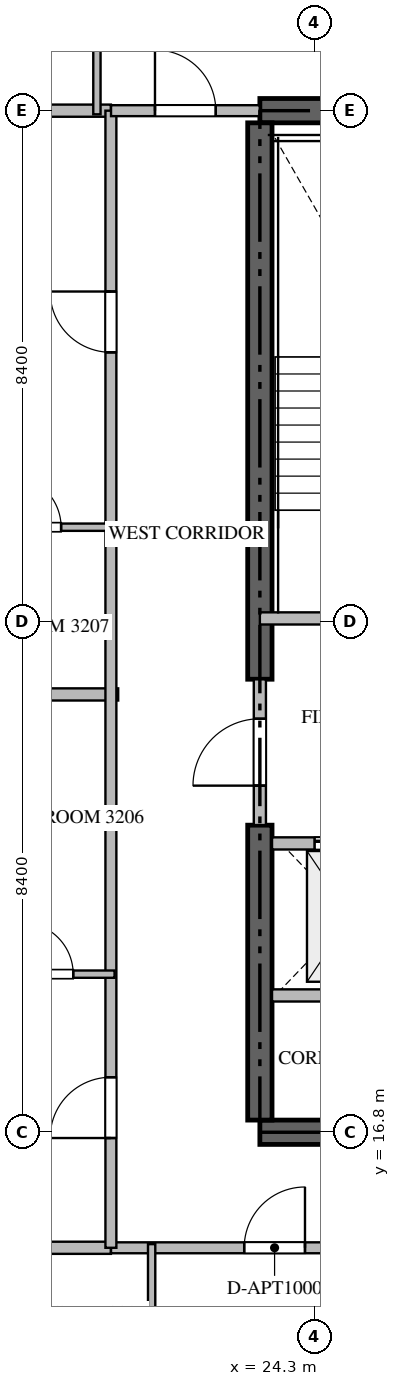
"""IFC4 building model, lengths in metres.
Left out: names, types, materials, properties, quantities, classifications, styles, units other than length and angle.
Written with IfcOpenShell. Run it as: python <this file> out.ifc"""

import sys

from ifc_helpers import new_model, si_unit, direction, frame, frame_2d, origin, place, context, subcontext, project, spatial, rectangle, extrude, source, transform, mapped, element, fill, save


model = new_model("IFC4")
c1 = context("Model", 3, precision=1e-05, world=origin(), true_north=direction((0.0, 1.0)))
c2 = subcontext(c1, "Body", "Model", "MODEL_VIEW")
j1 = project(units=[si_unit("LENGTHUNIT", "METRE"), si_unit("PLANEANGLEUNIT", "RADIAN")], contexts=[c1])
p1 = place(None, origin())
s1 = spatial("IfcSite", under=j1, at=p1, CompositionType="ELEMENT")
p2 = place(p1, origin())
s2 = spatial("IfcBuilding", under=s1, at=p2, CompositionType="ELEMENT")
p3 = place(p2, frame((0.0, 0.0, 131.4)))
s3 = spatial("IfcBuildingStorey", under=s2, at=p3, CompositionType="ELEMENT", Elevation=131.4)
for number, where, z_axis, x_axis in (
    (1, (23.4, 16.8, -0.26), (0.0, 0.0, 1.0), (1.0, 0.0, 0.0)),
    (2, (41.4, 33.6, -0.26), (0.0, 0.0, 1.0), (-1.0, 0.0, 0.0)),
):
    element("IfcWall", number, at=place(p3, frame(where, z_axis=z_axis, x_axis=x_axis)), inside=s3, PredefinedType="SHEAR", context=c2, shape_type="SweptSolid", body=[
        extrude(rectangle(XDim=18.0, YDim=0.4, at=frame_2d((9.0, 0.0))), origin(), (0.0, 0.0, 1.0), 3.748),
    ])
p4 = place(p3, frame((23.4, 17.0, -0.26), z_axis=(0.0, 0.0, 1.0), x_axis=(0.0, 1.0, 0.0)))
e3 = element("IfcWall", 3, at=p4, inside=s3, PredefinedType="SHEAR", context=c2, shape_type="SweptSolid", body=[
    extrude(rectangle(XDim=4.85, YDim=0.4, at=frame_2d((2.425, 0.0))), origin(), (0.0, 0.0, 1.0), 3.748),
])
p5 = place(p3, frame((23.4, 24.25, -0.26), z_axis=(0.0, 0.0, 1.0), x_axis=(0.0, 1.0, 0.0)))
e4 = element("IfcWall", 4, at=p5, inside=s3, PredefinedType="SHEAR", context=c2, shape_type="SweptSolid", body=[
    extrude(rectangle(XDim=9.15, YDim=0.4, at=frame_2d((4.575, 0.0))), origin(), (0.0, 0.0, 1.0), 3.748),
])
p6 = place(p3, frame((23.4, 25.25, 0.0), z_axis=(0.0, 0.0, 1.0), x_axis=(1.0, 0.0, 0.0)))
e5 = element("IfcWall", 5, at=p6, inside=s3, PredefinedType="STANDARD", context=c2, shape_type="SweptSolid", body=[
    extrude(rectangle(XDim=4.45, YDim=0.2, at=frame_2d((2.225, 0.0))), origin(), (0.0, 0.0, 1.0), 3.49),
])
p7 = place(p6, frame((1.65, 0.0, 0.0)))
e6 = element("IfcOpeningElement", 6, at=p7, cuts=e5, PredefinedType="OPENING", context=c2, shape_type="SweptSolid", body=[
    extrude(rectangle(XDim=1.1, YDim=2.15, at=frame_2d((0.55, 1.075))), frame((0.0, 0.11, 0.0), z_axis=(0.0, -1.0, 0.0), x_axis=(1.0, 0.0, 0.0)), (0.0, 0.0, 1.0), 0.22),
])
p8 = place(p3, frame((23.6, 21.55, 0.0), z_axis=(0.0, 0.0, 1.0), x_axis=(1.0, 0.0, 0.0)))
e7 = element("IfcWall", 7, at=p8, inside=s3, PredefinedType="STANDARD", context=c2, shape_type="SweptSolid", body=[
    extrude(rectangle(XDim=2.45, YDim=0.2, at=frame_2d((1.225, 0.0))), origin(), (0.0, 0.0, 1.0), 3.49),
])
p9 = place(p8, frame((0.7, 0.0, 0.0)))
e8 = element("IfcOpeningElement", 8, at=p9, cuts=e7, PredefinedType="OPENING", context=c2, shape_type="SweptSolid", body=[
    extrude(rectangle(XDim=1.2, YDim=2.2, at=frame_2d((0.6, 1.1))), frame((0.0, 0.11, 0.0), z_axis=(0.0, -1.0, 0.0), x_axis=(1.0, 0.0, 0.0)), (0.0, 0.0, 1.0), 0.22),
])
p10 = place(p3, frame((23.6, 19.05, 0.0), z_axis=(0.0, 0.0, 1.0), x_axis=(1.0, 0.0, 0.0)))
e9 = element("IfcWall", 9, at=p10, inside=s3, PredefinedType="STANDARD", context=c2, shape_type="SweptSolid", body=[
    extrude(rectangle(XDim=2.45, YDim=0.2, at=frame_2d((1.225, 0.0))), origin(), (0.0, 0.0, 1.0), 3.49),
])
p11 = place(p3, frame((23.4, 21.852, 0.0), z_axis=(0.0, 0.0, 1.0), x_axis=(0.0, 1.0, 0.0)))
e10 = element("IfcWall", 10, at=p11, inside=s3, PredefinedType="STANDARD", context=c2, shape_type="SweptSolid", body=[
    extrude(rectangle(XDim=2.396, YDim=0.2, at=frame_2d((1.198, 0.0))), origin(), (0.0, 0.0, 1.0), 3.49),
])
p12 = place(p11, frame((0.648, 0.0, 0.0)))
e11 = element("IfcOpeningElement", 11, at=p12, cuts=e10, PredefinedType="OPENING", context=c2, shape_type="SweptSolid", body=[
    extrude(rectangle(XDim=1.1, YDim=2.15, at=frame_2d((0.55, 1.075))), frame((0.0, 0.11, 0.0), z_axis=(0.0, -1.0, 0.0), x_axis=(1.0, 0.0, 0.0)), (0.0, 0.0, 1.0), 0.22),
])
p13 = place(p3, frame((7.882, 24.0, 0.0), z_axis=(0.0, 0.0, 1.0), x_axis=(1.0, 0.0, 0.0)))
e12 = element("IfcWall", 12, at=p13, inside=s3, PredefinedType="PARTITIONING", context=c2, shape_type="SweptSolid", body=[
    extrude(rectangle(XDim=13.188, YDim=0.2, at=frame_2d((6.594, 0.0))), origin(), (0.0, 0.0, 1.0), 3.49),
])
for number, where, z_axis, x_axis in (
    (13, (7.882, 14.9, 0.0), (0.0, 0.0, 1.0), (1.0, 0.0, 0.0)),
    (14, (7.882, 33.6, 0.0), (0.0, 0.0, 1.0), (1.0, 0.0, 0.0)),
):
    element("IfcWall", number, at=place(p3, frame(where, z_axis=z_axis, x_axis=x_axis)), inside=s3, PredefinedType="PARTITIONING", context=c2, shape_type="SweptSolid", body=[
        extrude(rectangle(XDim=13.068, YDim=0.2, at=frame_2d((6.534, 0.0))), origin(), (0.0, 0.0, 1.0), 3.49),
    ])
p14 = place(p3, frame((20.952, 14.9, 0.0), z_axis=(0.0, 0.0, 1.0), x_axis=(1.0, 0.0, 0.0)))
e15 = element("IfcWall", 15, at=p14, inside=s3, PredefinedType="PARTITIONING", context=c2, shape_type="SweptSolid", body=[
    extrude(rectangle(XDim=22.896, YDim=0.18, at=frame_2d((11.448, 0.0))), origin(), (0.0, 0.0, 1.0), 3.49),
])
p15 = place(p14, frame((2.19, 0.0, 0.0)))
e16 = element("IfcOpeningElement", 16, at=p15, cuts=e15, PredefinedType="OPENING", context=c2, shape_type="SweptSolid", body=[
    extrude(rectangle(XDim=1.0, YDim=2.15, at=frame_2d((0.5, 1.075))), frame((0.0, 0.1, 0.0), z_axis=(0.0, -1.0, 0.0), x_axis=(1.0, 0.0, 0.0)), (0.0, 0.0, 1.0), 0.2),
])
p16 = place(p14, frame((14.955, 0.0, 0.0)))
e17 = element("IfcOpeningElement", 17, at=p16, cuts=e15, PredefinedType="OPENING", context=c2, shape_type="SweptSolid", body=[
    extrude(rectangle(XDim=1.0, YDim=2.15, at=frame_2d((0.5, 1.075))), frame((0.0, 0.1, 0.0), z_axis=(0.0, -1.0, 0.0), x_axis=(1.0, 0.0, 0.0)), (0.0, 0.0, 1.0), 0.2),
])
p17 = place(p14, frame((19.509, 0.0, 0.0)))
e18 = element("IfcOpeningElement", 18, at=p17, cuts=e15, PredefinedType="OPENING", context=c2, shape_type="SweptSolid", body=[
    extrude(rectangle(XDim=1.0, YDim=2.15, at=frame_2d((0.5, 1.075))), frame((0.0, 0.1, 0.0), z_axis=(0.0, -1.0, 0.0), x_axis=(1.0, 0.0, 0.0)), (0.0, 0.0, 1.0), 0.2),
])
p18 = place(p3, frame((20.95, 14.9, 0.0), z_axis=(0.0, 0.0, 1.0), x_axis=(0.0, 1.0, 0.0)))
e19 = element("IfcWall", 19, at=p18, inside=s3, PredefinedType="PARTITIONING", context=c2, shape_type="SweptSolid", body=[
    extrude(rectangle(XDim=18.7, YDim=0.18, at=frame_2d((9.35, 0.0))), origin(), (0.0, 0.0, 1.0), 3.49),
])
p19 = place(p18, frame((1.805, 0.0, 0.0)))
e20 = element("IfcOpeningElement", 20, at=p19, cuts=e19, PredefinedType="OPENING", context=c2, shape_type="SweptSolid", body=[
    extrude(rectangle(XDim=1.0, YDim=2.15, at=frame_2d((0.5, 1.075))), frame((0.0, 0.1, 0.0), z_axis=(0.0, -1.0, 0.0), x_axis=(1.0, 0.0, 0.0)), (0.0, 0.0, 1.0), 0.2),
])
p20 = place(p18, frame((14.726, 0.0, 0.0)))
e21 = element("IfcOpeningElement", 21, at=p20, cuts=e19, PredefinedType="OPENING", context=c2, shape_type="SweptSolid", body=[
    extrude(rectangle(XDim=1.0, YDim=2.15, at=frame_2d((0.5, 1.075))), frame((0.0, 0.1, 0.0), z_axis=(0.0, -1.0, 0.0), x_axis=(1.0, 0.0, 0.0)), (0.0, 0.0, 1.0), 0.2),
])
p21 = place(p3, frame((20.952, 33.6, 0.0), z_axis=(0.0, 0.0, 1.0), x_axis=(1.0, 0.0, 0.0)))
e22 = element("IfcWall", 22, at=p21, inside=s3, PredefinedType="PARTITIONING", context=c2, shape_type="SweptSolid", body=[
    extrude(rectangle(XDim=2.446, YDim=0.18, at=frame_2d((1.223, 0.0))), origin(), (0.0, 0.0, 1.0), 3.49),
])
p22 = place(p21, frame((0.723, 0.0, 0.0)))
e23 = element("IfcOpeningElement", 23, at=p22, cuts=e22, PredefinedType="OPENING", context=c2, shape_type="SweptSolid", body=[
    extrude(rectangle(XDim=1.0, YDim=2.15, at=frame_2d((0.5, 1.075))), frame((0.0, 0.1, 0.0), z_axis=(0.0, -1.0, 0.0), x_axis=(1.0, 0.0, 0.0)), (0.0, 0.0, 1.0), 0.2),
])
for number, where, z_axis, x_axis in (
    (24, (21.62, 12.15, 0.0), (0.0, 0.0, 1.0), (0.0, 1.0, 0.0)),
    (25, (20.72, 36.35, 0.0), (0.0, 0.0, 1.0), (0.0, -1.0, 0.0)),
):
    element("IfcWall", number, at=place(p3, frame(where, z_axis=z_axis, x_axis=x_axis)), inside=s3, PredefinedType="PARTITIONING", context=c2, shape_type="SweptSolid", body=[
        extrude(rectangle(XDim=2.81, YDim=0.12, at=frame_2d((1.405, 0.0))), origin(), (0.0, 0.0, 1.0), 3.49),
    ])
p23 = place(p3, frame((18.8, 19.4, 0.0), z_axis=(0.0, 0.0, 1.0), x_axis=(1.0, 0.0, 0.0)))
e26 = element("IfcWall", 26, at=p23, inside=s3, PredefinedType="PARTITIONING", context=c2, shape_type="SweptSolid", body=[
    extrude(rectangle(XDim=2.21, YDim=0.12, at=frame_2d((1.105, 0.0))), origin(), (0.0, 0.0, 1.0), 3.49),
])
p24 = place(p23, frame((0.68, 0.0, 0.0)))
e27 = element("IfcOpeningElement", 27, at=p24, cuts=e26, PredefinedType="OPENING", context=c2, shape_type="SweptSolid", body=[
    extrude(rectangle(XDim=0.85, YDim=2.1, at=frame_2d((0.425, 1.05))), frame((0.0, 0.07, 0.0), z_axis=(0.0, -1.0, 0.0), x_axis=(1.0, 0.0, 0.0)), (0.0, 0.0, 1.0), 0.14),
])
p25 = place(p3, frame((18.402, 26.75, 0.0), z_axis=(0.0, 0.0, 1.0), x_axis=(1.0, 0.0, 0.0)))
e28 = element("IfcWall", 28, at=p25, inside=s3, PredefinedType="PARTITIONING", context=c2, shape_type="SweptSolid", body=[
    extrude(rectangle(XDim=2.608, YDim=0.12, at=frame_2d((1.304, 0.0))), origin(), (0.0, 0.0, 1.0), 3.49),
])
p26 = place(p25, frame((0.879, 0.0, 0.0)))
e29 = element("IfcOpeningElement", 29, at=p26, cuts=e28, PredefinedType="OPENING", context=c2, shape_type="SweptSolid", body=[
    extrude(rectangle(XDim=0.85, YDim=2.1, at=frame_2d((0.425, 1.05))), frame((0.0, 0.07, 0.0), z_axis=(0.0, -1.0, 0.0), x_axis=(1.0, 0.0, 0.0)), (0.0, 0.0, 1.0), 0.14),
])
m1 = source(origin(), c2, "Body", "SweptSolid", [
    extrude(rectangle(XDim=1.2, YDim=2.2, at=frame_2d((0.6, 1.1))), frame((0.0, 0.025, 0.0), z_axis=(0.0, -1.0, 0.0), x_axis=(1.0, 0.0, 0.0)), (0.0, 0.0, 1.0), 0.05),
])
p27 = place(p9, origin())
e30 = element("IfcDoor", 30, at=p27, inside=s3, OperationType="DOUBLE_DOOR_SLIDING", PredefinedType="DOOR", context=c2, shape_type="MappedRepresentation", body=[
    mapped(m1, transform((0.0, 0.0, 0.0), scale=1.0)),
])
fill(e8, e30)
m2 = source(origin(), c2, "Body", "SweptSolid", [
    extrude(rectangle(XDim=1.1, YDim=2.15, at=frame_2d((0.55, 1.075))), frame((0.0, 0.025, 0.0), z_axis=(0.0, -1.0, 0.0), x_axis=(1.0, 0.0, 0.0)), (0.0, 0.0, 1.0), 0.05),
])
p28 = place(p12, origin())
e31 = element("IfcDoor", 31, at=p28, inside=s3, OperationType="SINGLE_SWING_LEFT", PredefinedType="DOOR", context=c2, shape_type="MappedRepresentation", body=[
    mapped(m2, transform((0.0, 0.0, 0.0), scale=1.0)),
])
fill(e11, e31)
m3 = source(origin(), c2, "Body", "SweptSolid", [
    extrude(rectangle(XDim=1.0, YDim=2.15, at=frame_2d((0.5, 1.075))), frame((0.0, 0.025, 0.0), z_axis=(0.0, -1.0, 0.0), x_axis=(1.0, 0.0, 0.0)), (0.0, 0.0, 1.0), 0.05),
])
p29 = place(p15, origin())
e32 = element("IfcDoor", 32, at=p29, inside=s3, OperationType="SINGLE_SWING_RIGHT", PredefinedType="DOOR", context=c2, shape_type="MappedRepresentation", body=[
    mapped(m3, transform((0.0, 0.0, 0.0), scale=1.0)),
])
fill(e16, e32)
p30 = place(p19, origin())
e33 = element("IfcDoor", 33, at=p30, inside=s3, OperationType="SINGLE_SWING_LEFT", PredefinedType="DOOR", context=c2, shape_type="MappedRepresentation", body=[
    mapped(m3, transform((0.0, 0.0, 0.0), scale=1.0)),
])
fill(e20, e33)
p31 = place(p20, origin())
e34 = element("IfcDoor", 34, at=p31, inside=s3, OperationType="SINGLE_SWING_RIGHT", PredefinedType="DOOR", context=c2, shape_type="MappedRepresentation", body=[
    mapped(m3, transform((0.0, 0.0, 0.0), scale=1.0)),
])
fill(e21, e34)
p32 = place(p22, origin())
e35 = element("IfcDoor", 35, at=p32, inside=s3, OperationType="SINGLE_SWING_LEFT", PredefinedType="DOOR", context=c2, shape_type="MappedRepresentation", body=[
    mapped(m3, transform((0.0, 0.0, 0.0), scale=1.0)),
])
fill(e23, e35)
m4 = source(origin(), c2, "Body", "SweptSolid", [
    extrude(rectangle(XDim=0.85, YDim=2.1, at=frame_2d((0.425, 1.05))), frame((0.0, 0.025, 0.0), z_axis=(0.0, -1.0, 0.0), x_axis=(1.0, 0.0, 0.0)), (0.0, 0.0, 1.0), 0.05),
])
p33 = place(p24, origin())
e36 = element("IfcDoor", 36, at=p33, inside=s3, OperationType="SINGLE_SWING_LEFT", PredefinedType="DOOR", context=c2, shape_type="MappedRepresentation", body=[
    mapped(m4, transform((0.0, 0.0, 0.0), scale=1.0)),
])
fill(e27, e36)
p34 = place(p26, origin())
e37 = element("IfcDoor", 37, at=p34, inside=s3, OperationType="SINGLE_SWING_LEFT", PredefinedType="DOOR", context=c2, shape_type="MappedRepresentation", body=[
    mapped(m4, transform((0.0, 0.0, 0.0), scale=1.0)),
])
fill(e29, e37)
save(model, sys.argv[1])
